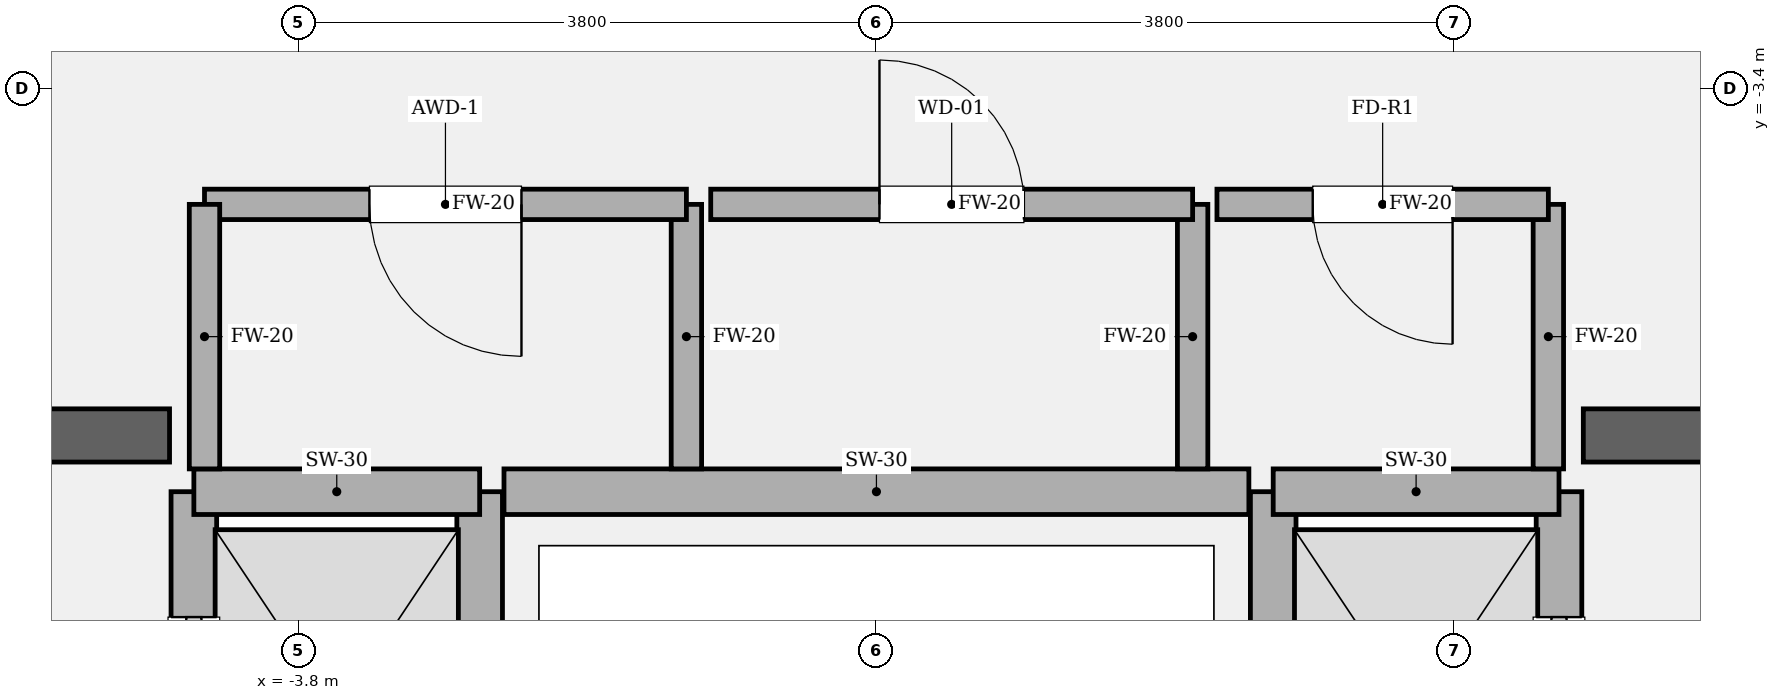
"""IFC4 building model, lengths in metres.
Left out: names, types, materials, properties, quantities, classifications, styles, units other than length and angle.
Written with IfcOpenShell. Run it as: python <this file> out.ifc"""

import sys

from ifc_helpers import new_model, si_unit, direction, frame, frame_2d, origin, place, context, subcontext, project, spatial, rectangle, extrude, element, fill, save


model = new_model("IFC4")
c1 = context("Model", 3, precision=1e-05, world=origin(), true_north=direction((0.0, 1.0)))
c2 = subcontext(c1, "Body", "Model", "MODEL_VIEW")
j1 = project(units=[si_unit("LENGTHUNIT", "METRE"), si_unit("PLANEANGLEUNIT", "RADIAN")], contexts=[c1])
p1 = place(None, origin())
s1 = spatial("IfcSite", under=j1, at=p1, CompositionType="ELEMENT")
p2 = place(p1, origin())
s2 = spatial("IfcBuilding", under=s1, at=p2, CompositionType="ELEMENT")
p3 = place(p2, frame((0.0, 0.0, 84.9)))
s3 = spatial("IfcBuildingStorey", under=s2, at=p3, CompositionType="ELEMENT", Elevation=84.9)
p4 = place(p3, frame((-9.825, -5.68, 0.0), z_axis=(0.0, 0.0, 1.0), x_axis=(1.0, 0.0, 0.0)))
e1 = element("IfcWall", 1, at=p4, inside=s3, PredefinedType="SOLIDWALL", context=c2, shape_type="SweptSolid", body=[
    extrude(rectangle(XDim=5.175, YDim=0.35, at=frame_2d((2.587, 0.0))), origin(), (0.0, 0.0, 1.0), 4.05),
])
p5 = place(p4, frame((1.285, 0.0, 0.0)))
e2 = element("IfcOpeningElement", 2, at=p5, cuts=e1, PredefinedType="OPENING", context=c2, shape_type="SweptSolid", body=[
    extrude(rectangle(XDim=1.18, YDim=2.2, at=frame_2d((0.59, 1.1))), frame((0.0, 0.185, 0.0), z_axis=(0.0, -1.0, 0.0), x_axis=(1.0, 0.0, 0.0)), (0.0, 0.0, 1.0), 0.37),
])
p6 = place(p3, frame((4.65, -5.68, 0.0), z_axis=(0.0, 0.0, 1.0), x_axis=(1.0, 0.0, 0.0)))
e3 = element("IfcWall", 3, at=p6, inside=s3, PredefinedType="SOLIDWALL", context=c2, shape_type="SweptSolid", body=[
    extrude(rectangle(XDim=5.175, YDim=0.35, at=frame_2d((2.587, 0.0))), origin(), (0.0, 0.0, 1.0), 4.05),
])
p7 = place(p6, frame((2.71, 0.0, 0.0)))
e4 = element("IfcOpeningElement", 4, at=p7, cuts=e3, PredefinedType="OPENING", context=c2, shape_type="SweptSolid", body=[
    extrude(rectangle(XDim=1.18, YDim=2.2, at=frame_2d((0.59, 1.1))), frame((0.0, 0.185, 0.0), z_axis=(0.0, -1.0, 0.0), x_axis=(1.0, 0.0, 0.0)), (0.0, 0.0, 1.0), 0.37),
])
p8 = place(p3, frame((-4.49, -8.82, 0.0), z_axis=(0.0, 0.0, 1.0), x_axis=(0.0, 1.0, 0.0)))
e5 = element("IfcWall", 5, at=p8, inside=s3, PredefinedType="SOLIDWALL", context=c2, shape_type="SweptSolid", body=[
    extrude(rectangle(XDim=2.77, YDim=0.3, at=frame_2d((1.385, 0.0))), origin(), (0.0, 0.0, 1.0), 3.81),
])
p9 = place(p8, frame((0.825, 0.0, 0.0)))
e6 = element("IfcOpeningElement", 6, at=p9, cuts=e5, PredefinedType="OPENING", context=c2, shape_type="SweptSolid", body=[
    extrude(rectangle(XDim=1.12, YDim=2.25, at=frame_2d((0.56, 1.125))), frame((0.0, 0.16, 0.0), z_axis=(0.0, -1.0, 0.0), x_axis=(1.0, 0.0, 0.0)), (0.0, 0.0, 1.0), 0.32),
])
p10 = place(p3, frame((-2.61, -8.82, 0.0), z_axis=(0.0, 0.0, 1.0), x_axis=(0.0, 1.0, 0.0)))
e7 = element("IfcWall", 7, at=p10, inside=s3, PredefinedType="SOLIDWALL", context=c2, shape_type="SweptSolid", body=[
    extrude(rectangle(XDim=2.77, YDim=0.3, at=frame_2d((1.385, 0.0))), origin(), (0.0, 0.0, 1.0), 3.81),
])
p11 = place(p3, frame((-4.49, -6.05, 0.0), z_axis=(0.0, 0.0, 1.0), x_axis=(1.0, 0.0, 0.0)))
e8 = element("IfcWall", 8, at=p11, inside=s3, PredefinedType="SOLIDWALL", context=c2, shape_type="SweptSolid", body=[
    extrude(rectangle(XDim=1.88, YDim=0.3, at=frame_2d((0.94, 0.0))), origin(), (0.0, 0.0, 1.0), 3.81),
])
p12 = place(p3, frame((4.49, -8.82, 0.0), z_axis=(0.0, 0.0, 1.0), x_axis=(0.0, 1.0, 0.0)))
e9 = element("IfcWall", 9, at=p12, inside=s3, PredefinedType="SOLIDWALL", context=c2, shape_type="SweptSolid", body=[
    extrude(rectangle(XDim=2.77, YDim=0.3, at=frame_2d((1.385, 0.0))), origin(), (0.0, 0.0, 1.0), 3.81),
])
p13 = place(p12, frame((0.825, 0.0, 0.0)))
e10 = element("IfcOpeningElement", 10, at=p13, cuts=e9, PredefinedType="OPENING", context=c2, shape_type="SweptSolid", body=[
    extrude(rectangle(XDim=1.12, YDim=2.25, at=frame_2d((0.56, 1.125))), frame((0.0, 0.16, 0.0), z_axis=(0.0, -1.0, 0.0), x_axis=(1.0, 0.0, 0.0)), (0.0, 0.0, 1.0), 0.32),
])
p14 = place(p3, frame((2.61, -8.82, 0.0), z_axis=(0.0, 0.0, 1.0), x_axis=(0.0, 1.0, 0.0)))
e11 = element("IfcWall", 11, at=p14, inside=s3, PredefinedType="SOLIDWALL", context=c2, shape_type="SweptSolid", body=[
    extrude(rectangle(XDim=2.77, YDim=0.3, at=frame_2d((1.385, 0.0))), origin(), (0.0, 0.0, 1.0), 3.81),
])
p15 = place(p3, frame((2.61, -6.05, 0.0), z_axis=(0.0, 0.0, 1.0), x_axis=(1.0, 0.0, 0.0)))
e12 = element("IfcWall", 12, at=p15, inside=s3, PredefinedType="SOLIDWALL", context=c2, shape_type="SweptSolid", body=[
    extrude(rectangle(XDim=1.88, YDim=0.3, at=frame_2d((0.94, 0.0))), origin(), (0.0, 0.0, 1.0), 3.81),
])
p16 = place(p3, frame((-2.45, -6.05, 0.0), z_axis=(0.0, 0.0, 1.0), x_axis=(1.0, 0.0, 0.0)))
e13 = element("IfcWall", 13, at=p16, inside=s3, PredefinedType="SOLIDWALL", context=c2, shape_type="SweptSolid", body=[
    extrude(rectangle(XDim=4.9, YDim=0.3, at=frame_2d((2.45, 0.0))), origin(), (0.0, 0.0, 1.0), 3.81),
])
p17 = place(p3, frame((-1.25, -5.9, 0.0), z_axis=(0.0, 0.0, 1.0), x_axis=(0.0, 1.0, 0.0)))
e14 = element("IfcWall", 14, at=p17, inside=s3, PredefinedType="SOLIDWALL", context=c2, shape_type="SweptSolid", body=[
    extrude(rectangle(XDim=1.74, YDim=0.2, at=frame_2d((0.87, 0.0))), origin(), (0.0, 0.0, 1.0), 3.81),
])
p18 = place(p3, frame((-1.25, -4.16, 0.0), z_axis=(0.0, 0.0, 1.0), x_axis=(-1.0, 0.0, 0.0)))
e15 = element("IfcWall", 15, at=p18, inside=s3, PredefinedType="SOLIDWALL", context=c2, shape_type="SweptSolid", body=[
    extrude(rectangle(XDim=3.17, YDim=0.2, at=frame_2d((1.585, 0.0))), origin(), (0.0, 0.0, 1.0), 3.81),
])
p19 = place(p18, frame((1.085, 0.0, 0.0)))
e16 = element("IfcOpeningElement", 16, at=p19, cuts=e15, PredefinedType="OPENING", context=c2, shape_type="SweptSolid", body=[
    extrude(rectangle(XDim=1.0, YDim=2.15, at=frame_2d((0.5, 1.075))), frame((0.0, 0.11, 0.0), z_axis=(0.0, -1.0, 0.0), x_axis=(1.0, 0.0, 0.0)), (0.0, 0.0, 1.0), 0.22),
])
for number, where, z_axis, x_axis in (
    (17, (-4.42, -4.16, 0.0), (0.0, 0.0, 1.0), (0.0, -1.0, 0.0)),
    (18, (2.08, -5.9, 0.0), (0.0, 0.0, 1.0), (0.0, 1.0, 0.0)),
):
    element("IfcWall", number, at=place(p3, frame(where, z_axis=z_axis, x_axis=x_axis)), inside=s3, PredefinedType="SOLIDWALL", context=c2, shape_type="SweptSolid", body=[
        extrude(rectangle(XDim=1.74, YDim=0.2, at=frame_2d((0.87, 0.0))), origin(), (0.0, 0.0, 1.0), 3.81),
    ])
p20 = place(p3, frame((2.08, -4.16, 0.0), z_axis=(0.0, 0.0, 1.0), x_axis=(-1.0, 0.0, 0.0)))
e19 = element("IfcWall", 19, at=p20, inside=s3, PredefinedType="SOLIDWALL", context=c2, shape_type="SweptSolid", body=[
    extrude(rectangle(XDim=3.17, YDim=0.2, at=frame_2d((1.585, 0.0))), origin(), (0.0, 0.0, 1.0), 3.81),
])
p21 = place(p20, frame((1.11, 0.0, 0.0)))
e20 = element("IfcOpeningElement", 20, at=p21, cuts=e19, PredefinedType="OPENING", context=c2, shape_type="SweptSolid", body=[
    extrude(rectangle(XDim=0.95, YDim=2.15, at=frame_2d((0.475, 1.075))), frame((0.0, 0.11, 0.0), z_axis=(0.0, -1.0, 0.0), x_axis=(1.0, 0.0, 0.0)), (0.0, 0.0, 1.0), 0.22),
])
p22 = place(p3, frame((4.42, -5.9, 0.0), z_axis=(0.0, 0.0, 1.0), x_axis=(0.0, 1.0, 0.0)))
e21 = element("IfcWall", 21, at=p22, inside=s3, PredefinedType="SOLIDWALL", context=c2, shape_type="SweptSolid", body=[
    extrude(rectangle(XDim=1.74, YDim=0.2, at=frame_2d((0.87, 0.0))), origin(), (0.0, 0.0, 1.0), 3.81),
])
p23 = place(p3, frame((4.42, -4.16, 0.0), z_axis=(0.0, 0.0, 1.0), x_axis=(-1.0, 0.0, 0.0)))
e22 = element("IfcWall", 22, at=p23, inside=s3, PredefinedType="SOLIDWALL", context=c2, shape_type="SweptSolid", body=[
    extrude(rectangle(XDim=2.18, YDim=0.2, at=frame_2d((1.09, 0.0))), origin(), (0.0, 0.0, 1.0), 3.81),
])
p24 = place(p23, frame((0.63, 0.0, 0.0)))
e23 = element("IfcOpeningElement", 23, at=p24, cuts=e22, PredefinedType="OPENING", context=c2, shape_type="SweptSolid", body=[
    extrude(rectangle(XDim=0.92, YDim=2.1, at=frame_2d((0.46, 1.05))), frame((0.0, 0.11, 0.0), z_axis=(0.0, -1.0, 0.0), x_axis=(1.0, 0.0, 0.0)), (0.0, 0.0, 1.0), 0.22),
])
p25 = place(p9, origin())
e24 = element("IfcDoor", 24, at=p25, inside=s3, OperationType="SLIDING_TO_LEFT", PredefinedType="DOOR", context=c2, shape_type="SweptSolid", body=[
    extrude(rectangle(XDim=1.12, YDim=2.25, at=frame_2d((0.56, 1.125))), frame((0.0, 0.025, 0.0), z_axis=(0.0, -1.0, 0.0), x_axis=(1.0, 0.0, 0.0)), (0.0, 0.0, 1.0), 0.05),
])
fill(e6, e24)
p26 = place(p13, origin())
e25 = element("IfcDoor", 25, at=p26, inside=s3, OperationType="SLIDING_TO_RIGHT", PredefinedType="DOOR", context=c2, shape_type="SweptSolid", body=[
    extrude(rectangle(XDim=1.12, YDim=2.25, at=frame_2d((0.56, 1.125))), frame((0.0, 0.025, 0.0), z_axis=(0.0, -1.0, 0.0), x_axis=(1.0, 0.0, 0.0)), (0.0, 0.0, 1.0), 0.05),
])
fill(e10, e25)
p27 = place(p19, origin())
e26 = element("IfcDoor", 26, at=p27, inside=s3, OperationType="SINGLE_SWING_LEFT", PredefinedType="DOOR", context=c2, shape_type="SweptSolid", body=[
    extrude(rectangle(XDim=1.0, YDim=2.15, at=frame_2d((0.5, 1.075))), frame((0.0, 0.025, 0.0), z_axis=(0.0, -1.0, 0.0), x_axis=(1.0, 0.0, 0.0)), (0.0, 0.0, 1.0), 0.05),
])
fill(e16, e26)
p28 = place(p21, origin())
e27 = element("IfcDoor", 27, at=p28, inside=s3, OperationType="SINGLE_SWING_RIGHT", PredefinedType="DOOR", context=c2, shape_type="SweptSolid", body=[
    extrude(rectangle(XDim=0.95, YDim=2.15, at=frame_2d((0.475, 1.075))), frame((0.0, 0.025, 0.0), z_axis=(0.0, -1.0, 0.0), x_axis=(1.0, 0.0, 0.0)), (0.0, 0.0, 1.0), 0.05),
])
fill(e20, e27)
p29 = place(p24, origin())
e28 = element("IfcDoor", 28, at=p29, inside=s3, OperationType="SINGLE_SWING_LEFT", PredefinedType="DOOR", context=c2, shape_type="SweptSolid", body=[
    extrude(rectangle(XDim=0.92, YDim=2.1, at=frame_2d((0.46, 1.05))), frame((0.0, 0.025, 0.0), z_axis=(0.0, -1.0, 0.0), x_axis=(1.0, 0.0, 0.0)), (0.0, 0.0, 1.0), 0.05),
])
fill(e23, e28)
save(model, sys.argv[1])
